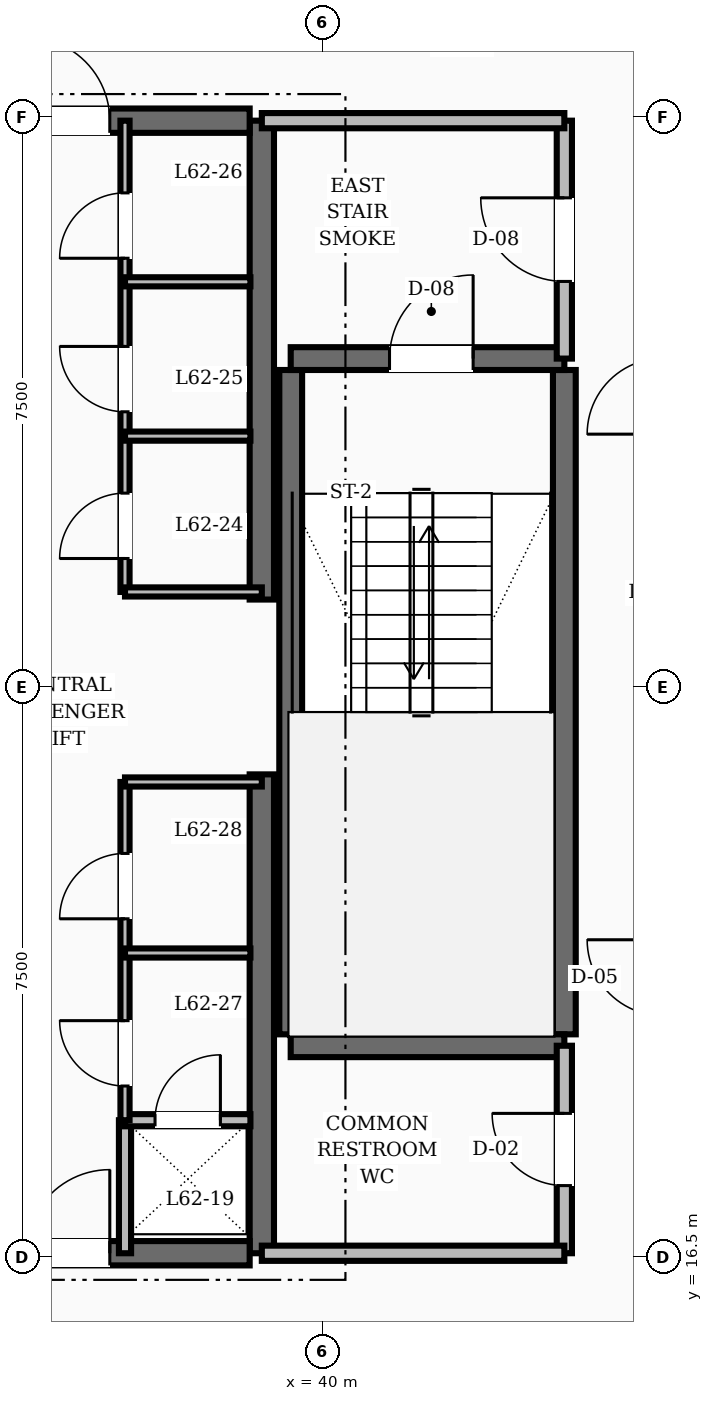
"""IFC4 building model, lengths in metres.
Left out: names, types, materials, properties, quantities, classifications, styles, units other than length and angle.
Written with IfcOpenShell. Run it as: python <this file> out.ifc"""

import sys

from ifc_helpers import new_model, si_unit, direction, frame, frame_2d, origin, place, context, subcontext, project, spatial, rectangle, extrude, element, fill, save


model = new_model("IFC4")
c1 = context("Model", 3, precision=1e-05, world=origin(), true_north=direction((0.0, 1.0)))
c2 = subcontext(c1, "Body", "Model", "MODEL_VIEW")
j1 = project(units=[si_unit("LENGTHUNIT", "METRE"), si_unit("PLANEANGLEUNIT", "RADIAN")], contexts=[c1])
p1 = place(None, origin())
s1 = spatial("IfcSite", under=j1, at=p1, CompositionType="ELEMENT")
p2 = place(p1, origin())
s2 = spatial("IfcBuilding", under=s1, at=p2, CompositionType="ELEMENT")
p3 = place(p2, frame((0.0, 0.0, 240.0)))
s3 = spatial("IfcBuildingStorey", under=s2, at=p3, CompositionType="ELEMENT", Elevation=240.0)
for number, where, z_axis, x_axis in (
    (1, (39.2, 16.55, 0.0), (0.0, 0.0, 1.0), (0.0, 1.0, 0.0)),
    (2, (39.2, 25.15, 0.0), (0.0, 0.0, 1.0), (0.0, 1.0, 0.0)),
):
    element("IfcWall", number, at=place(p3, frame(where, z_axis=z_axis, x_axis=x_axis)), inside=s3, PredefinedType="SHEAR", context=c2, shape_type="SweptSolid", body=[
        extrude(rectangle(XDim=6.3, YDim=0.32, at=frame_2d((3.15, 0.0))), origin(), (0.0, 0.0, 1.0), 3.6),
    ])
p4 = place(p3, frame((35.8, 16.55, 0.0), z_axis=(0.0, 0.0, 1.0), x_axis=(1.0, 0.0, 0.0)))
e3 = element("IfcWall", 3, at=p4, inside=s3, PredefinedType="SHEAR", context=c2, shape_type="SweptSolid", body=[
    extrude(rectangle(XDim=3.24, YDim=0.32, at=frame_2d((1.62, 0.0))), origin(), (0.0, 0.0, 1.0), 3.6),
])
p5 = place(p4, frame((0.3, 0.0, 0.0)))
e4 = element("IfcOpeningElement", 4, at=p5, cuts=e3, PredefinedType="OPENING", context=c2, shape_type="SweptSolid", body=[
    extrude(rectangle(XDim=1.1, YDim=2.1, at=frame_2d((0.55, 1.05))), frame((0.0, 0.17, 0.0), z_axis=(0.0, -1.0, 0.0), x_axis=(1.0, 0.0, 0.0)), (0.0, 0.0, 1.0), 0.34),
])
p6 = place(p3, frame((35.8, 31.45, 0.0), z_axis=(0.0, 0.0, 1.0), x_axis=(1.0, 0.0, 0.0)))
e5 = element("IfcWall", 5, at=p6, inside=s3, PredefinedType="SHEAR", context=c2, shape_type="SweptSolid", body=[
    extrude(rectangle(XDim=3.24, YDim=0.32, at=frame_2d((1.62, 0.0))), origin(), (0.0, 0.0, 1.0), 3.6),
])
p7 = place(p6, frame((0.3, 0.0, 0.0)))
e6 = element("IfcOpeningElement", 6, at=p7, cuts=e5, PredefinedType="OPENING", context=c2, shape_type="SweptSolid", body=[
    extrude(rectangle(XDim=1.1, YDim=2.1, at=frame_2d((0.55, 1.05))), frame((0.0, 0.17, 0.0), z_axis=(0.0, -1.0, 0.0), x_axis=(1.0, 0.0, 0.0)), (0.0, 0.0, 1.0), 0.34),
])
for number, where, z_axis, x_axis in (
    (7, (43.18, 19.43, 0.0), (0.0, 0.0, 1.0), (0.0, 1.0, 0.0)),
    (8, (39.58, 19.43, 0.0), (0.0, 0.0, 1.0), (0.0, 1.0, 0.0)),
):
    element("IfcWall", number, at=place(p3, frame(where, z_axis=z_axis, x_axis=x_axis)), inside=s3, PredefinedType="SHEAR", context=c2, shape_type="SweptSolid", body=[
        extrude(rectangle(XDim=8.74, YDim=0.3, at=frame_2d((4.37, 0.0))), origin(), (0.0, 0.0, 1.0), 3.6),
    ])
p8 = place(p3, frame((39.58, 19.28, 0.0), z_axis=(0.0, 0.0, 1.0), x_axis=(1.0, 0.0, 0.0)))
e9 = element("IfcWall", 9, at=p8, inside=s3, PredefinedType="SHEAR", context=c2, shape_type="SweptSolid", body=[
    extrude(rectangle(XDim=3.6, YDim=0.3, at=frame_2d((1.8, 0.0))), origin(), (0.0, 0.0, 1.0), 3.6),
])
p9 = place(p3, frame((39.58, 28.32, 0.0), z_axis=(0.0, 0.0, 1.0), x_axis=(1.0, 0.0, 0.0)))
e10 = element("IfcWall", 10, at=p9, inside=s3, PredefinedType="SHEAR", context=c2, shape_type="SweptSolid", body=[
    extrude(rectangle(XDim=3.6, YDim=0.3, at=frame_2d((1.8, 0.0))), origin(), (0.0, 0.0, 1.0), 3.6),
])
p10 = place(p9, frame((1.3, 0.0, 0.0)))
e11 = element("IfcOpeningElement", 11, at=p10, cuts=e10, PredefinedType="OPENING", context=c2, shape_type="SweptSolid", body=[
    extrude(rectangle(XDim=1.1, YDim=2.1, at=frame_2d((0.55, 1.05))), frame((0.0, 0.16, 0.0), z_axis=(0.0, -1.0, 0.0), x_axis=(1.0, 0.0, 0.0)), (0.0, 0.0, 1.0), 0.32),
])
p11 = place(p3, frame((43.18, 28.32, 0.0), z_axis=(0.0, 0.0, 1.0), x_axis=(0.0, 1.0, 0.0)))
e12 = element("IfcWall", 12, at=p11, inside=s3, PredefinedType="SOLIDWALL", context=c2, shape_type="SweptSolid", body=[
    extrude(rectangle(XDim=3.13, YDim=0.2, at=frame_2d((1.565, 0.0))), origin(), (0.0, 0.0, 1.0), 2.87),
])
p12 = place(p11, frame((1.015, 0.0, 0.0)))
e13 = element("IfcOpeningElement", 13, at=p12, cuts=e12, PredefinedType="OPENING", context=c2, shape_type="SweptSolid", body=[
    extrude(rectangle(XDim=1.1, YDim=2.1, at=frame_2d((0.55, 1.05))), frame((0.0, 0.11, 0.0), z_axis=(0.0, -1.0, 0.0), x_axis=(1.0, 0.0, 0.0)), (0.0, 0.0, 1.0), 0.22),
])
p13 = place(p3, frame((39.2, 31.45, 0.0), z_axis=(0.0, 0.0, 1.0), x_axis=(1.0, 0.0, 0.0)))
e14 = element("IfcWall", 14, at=p13, inside=s3, PredefinedType="SOLIDWALL", context=c2, shape_type="SweptSolid", body=[
    extrude(rectangle(XDim=3.98, YDim=0.2, at=frame_2d((1.99, 0.0))), origin(), (0.0, 0.0, 1.0), 2.87),
])
p14 = place(p3, frame((43.18, 16.55, 0.0), z_axis=(0.0, 0.0, 1.0), x_axis=(0.0, 1.0, 0.0)))
e15 = element("IfcWall", 15, at=p14, inside=s3, PredefinedType="SOLIDWALL", context=c2, shape_type="SweptSolid", body=[
    extrude(rectangle(XDim=2.73, YDim=0.2, at=frame_2d((1.365, 0.0))), origin(), (0.0, 0.0, 1.0), 2.87),
])
p15 = place(p14, frame((0.89, 0.0, 0.0)))
e16 = element("IfcOpeningElement", 16, at=p15, cuts=e15, PredefinedType="OPENING", context=c2, shape_type="SweptSolid", body=[
    extrude(rectangle(XDim=0.95, YDim=2.1, at=frame_2d((0.475, 1.05))), frame((0.0, 0.11, 0.0), z_axis=(0.0, -1.0, 0.0), x_axis=(1.0, 0.0, 0.0)), (0.0, 0.0, 1.0), 0.22),
])
p16 = place(p3, frame((39.2, 16.55, 0.0), z_axis=(0.0, 0.0, 1.0), x_axis=(1.0, 0.0, 0.0)))
e17 = element("IfcWall", 17, at=p16, inside=s3, PredefinedType="SOLIDWALL", context=c2, shape_type="SweptSolid", body=[
    extrude(rectangle(XDim=3.98, YDim=0.2, at=frame_2d((1.99, 0.0))), origin(), (0.0, 0.0, 1.0), 2.87),
])
p17 = place(p3, frame((37.4, 16.55, 0.0), z_axis=(0.0, 0.0, 1.0), x_axis=(0.0, 1.0, 0.0)))
e18 = element("IfcWall", 18, at=p17, inside=s3, PredefinedType="SOLIDWALL", context=c2, shape_type="SweptSolid", body=[
    extrude(rectangle(XDim=1.75, YDim=0.16, at=frame_2d((0.875, 0.0))), origin(), (0.0, 0.0, 1.0), 2.87),
])
p18 = place(p3, frame((37.4, 18.3, 0.0), z_axis=(0.0, 0.0, 1.0), x_axis=(1.0, 0.0, 0.0)))
e19 = element("IfcWall", 19, at=p18, inside=s3, PredefinedType="SOLIDWALL", context=c2, shape_type="SweptSolid", body=[
    extrude(rectangle(XDim=1.65, YDim=0.16, at=frame_2d((0.825, 0.0))), origin(), (0.0, 0.0, 1.0), 2.87),
])
p19 = place(p18, frame((0.395, 0.0, 0.0)))
e20 = element("IfcOpeningElement", 20, at=p19, cuts=e19, PredefinedType="OPENING", context=c2, shape_type="SweptSolid", body=[
    extrude(rectangle(XDim=0.86, YDim=2.1, at=frame_2d((0.43, 1.05))), frame((0.0, 0.09, 0.0), z_axis=(0.0, -1.0, 0.0), x_axis=(1.0, 0.0, 0.0)), (0.0, 0.0, 1.0), 0.18),
])
p20 = place(p3, frame((37.4, 25.25, 0.0), z_axis=(0.0, 0.0, 1.0), x_axis=(0.0, 1.0, 0.0)))
e21 = element("IfcWall", 21, at=p20, inside=s3, PredefinedType="PARTITIONING", context=c2, shape_type="SweptSolid", body=[
    extrude(rectangle(XDim=6.2, YDim=0.12, at=frame_2d((3.1, 0.0))), origin(), (0.0, 0.0, 1.0), 2.87),
])
p21 = place(p20, frame((0.44, 0.0, 0.0)))
e22 = element("IfcOpeningElement", 22, at=p21, cuts=e21, PredefinedType="OPENING", context=c2, shape_type="SweptSolid", body=[
    extrude(rectangle(XDim=0.86, YDim=2.1, at=frame_2d((0.43, 1.05))), frame((0.0, 0.07, 0.0), z_axis=(0.0, -1.0, 0.0), x_axis=(1.0, 0.0, 0.0)), (0.0, 0.0, 1.0), 0.14),
])
p22 = place(p20, frame((2.37, 0.0, 0.0)))
e23 = element("IfcOpeningElement", 23, at=p22, cuts=e21, PredefinedType="OPENING", context=c2, shape_type="SweptSolid", body=[
    extrude(rectangle(XDim=0.86, YDim=2.1, at=frame_2d((0.43, 1.05))), frame((0.0, 0.07, 0.0), z_axis=(0.0, -1.0, 0.0), x_axis=(1.0, 0.0, 0.0)), (0.0, 0.0, 1.0), 0.14),
])
p23 = place(p20, frame((4.39, 0.0, 0.0)))
e24 = element("IfcOpeningElement", 24, at=p23, cuts=e21, PredefinedType="OPENING", context=c2, shape_type="SweptSolid", body=[
    extrude(rectangle(XDim=0.86, YDim=2.1, at=frame_2d((0.43, 1.05))), frame((0.0, 0.07, 0.0), z_axis=(0.0, -1.0, 0.0), x_axis=(1.0, 0.0, 0.0)), (0.0, 0.0, 1.0), 0.14),
])
p24 = place(p3, frame((37.4, 25.25, 0.0), z_axis=(0.0, 0.0, 1.0), x_axis=(1.0, 0.0, 0.0)))
e25 = element("IfcWall", 25, at=p24, inside=s3, PredefinedType="PARTITIONING", context=c2, shape_type="SweptSolid", body=[
    extrude(rectangle(XDim=1.8, YDim=0.12, at=frame_2d((0.9, 0.0))), origin(), (0.0, 0.0, 1.0), 2.87),
])
p25 = place(p3, frame((37.4, 18.3, 0.0), z_axis=(0.0, 0.0, 1.0), x_axis=(0.0, 1.0, 0.0)))
e26 = element("IfcWall", 26, at=p25, inside=s3, PredefinedType="PARTITIONING", context=c2, shape_type="SweptSolid", body=[
    extrude(rectangle(XDim=4.45, YDim=0.12, at=frame_2d((2.225, 0.0))), origin(), (0.0, 0.0, 1.0), 2.87),
])
p26 = place(p25, frame((0.45, 0.0, 0.0)))
e27 = element("IfcOpeningElement", 27, at=p26, cuts=e26, PredefinedType="OPENING", context=c2, shape_type="SweptSolid", body=[
    extrude(rectangle(XDim=0.86, YDim=2.1, at=frame_2d((0.43, 1.05))), frame((0.0, 0.07, 0.0), z_axis=(0.0, -1.0, 0.0), x_axis=(1.0, 0.0, 0.0)), (0.0, 0.0, 1.0), 0.14),
])
p27 = place(p25, frame((2.65, 0.0, 0.0)))
e28 = element("IfcOpeningElement", 28, at=p27, cuts=e26, PredefinedType="OPENING", context=c2, shape_type="SweptSolid", body=[
    extrude(rectangle(XDim=0.86, YDim=2.1, at=frame_2d((0.43, 1.05))), frame((0.0, 0.07, 0.0), z_axis=(0.0, -1.0, 0.0), x_axis=(1.0, 0.0, 0.0)), (0.0, 0.0, 1.0), 0.14),
])
p28 = place(p3, frame((37.4, 22.75, 0.0), z_axis=(0.0, 0.0, 1.0), x_axis=(1.0, 0.0, 0.0)))
e29 = element("IfcWall", 29, at=p28, inside=s3, PredefinedType="PARTITIONING", context=c2, shape_type="SweptSolid", body=[
    extrude(rectangle(XDim=1.8, YDim=0.12, at=frame_2d((0.9, 0.0))), origin(), (0.0, 0.0, 1.0), 2.87),
])
for number, where, z_axis, x_axis in (
    (30, (37.4, 27.3, 0.0), (0.0, 0.0, 1.0), (1.0, 0.0, 0.0)),
    (31, (37.4, 29.33, 0.0), (0.0, 0.0, 1.0), (1.0, 0.0, 0.0)),
    (32, (37.4, 20.5, 0.0), (0.0, 0.0, 1.0), (1.0, 0.0, 0.0)),
):
    element("IfcWall", number, at=place(p3, frame(where, z_axis=z_axis, x_axis=x_axis)), inside=s3, PredefinedType="PARTITIONING", context=c2, shape_type="SweptSolid", body=[
        extrude(rectangle(XDim=1.65, YDim=0.12, at=frame_2d((0.825, 0.0))), origin(), (0.0, 0.0, 1.0), 2.87),
    ])
for number, where, z_axis, x_axis in (
    (33, (44.427, 32.303, 0.0), (0.0, 0.0, 1.0), (-0.707, 0.707, 0.0)),
    (34, (42.365, 13.635, 0.0), (0.0, 0.0, 1.0), (0.707, 0.707, 0.0)),
):
    element("IfcWall", number, at=place(p3, frame(where, z_axis=z_axis, x_axis=x_axis)), inside=s3, PredefinedType="SOLIDWALL", context=c2, shape_type="SweptSolid", body=[
        extrude(rectangle(XDim=2.916, YDim=0.16, at=frame_2d((1.458, 0.0))), origin(), (0.0, 0.0, 1.0), 2.87),
    ])
p29 = place(p10, origin())
e35 = element("IfcDoor", 35, at=p29, inside=s3, OperationType="SINGLE_SWING_RIGHT", PredefinedType="DOOR", context=c2, shape_type="SweptSolid", body=[
    extrude(rectangle(XDim=1.1, YDim=2.1, at=frame_2d((0.55, 1.05))), frame((0.0, 0.025, 0.0), z_axis=(0.0, -1.0, 0.0), x_axis=(1.0, 0.0, 0.0)), (0.0, 0.0, 1.0), 0.05),
])
fill(e11, e35)
p30 = place(p12, origin())
e36 = element("IfcDoor", 36, at=p30, inside=s3, OperationType="SINGLE_SWING_RIGHT", PredefinedType="DOOR", context=c2, shape_type="SweptSolid", body=[
    extrude(rectangle(XDim=1.1, YDim=2.1, at=frame_2d((0.55, 1.05))), frame((0.0, 0.025, 0.0), z_axis=(0.0, -1.0, 0.0), x_axis=(1.0, 0.0, 0.0)), (0.0, 0.0, 1.0), 0.05),
])
fill(e13, e36)
p31 = place(p15, origin())
e37 = element("IfcDoor", 37, at=p31, inside=s3, OperationType="SINGLE_SWING_RIGHT", PredefinedType="DOOR", context=c2, shape_type="SweptSolid", body=[
    extrude(rectangle(XDim=0.95, YDim=2.1, at=frame_2d((0.475, 1.05))), frame((0.0, 0.025, 0.0), z_axis=(0.0, -1.0, 0.0), x_axis=(1.0, 0.0, 0.0)), (0.0, 0.0, 1.0), 0.05),
])
fill(e16, e37)
p32 = place(p7, origin())
e38 = element("IfcDoor", 38, at=p32, inside=s3, OperationType="SINGLE_SWING_LEFT", PredefinedType="DOOR", context=c2, shape_type="SweptSolid", body=[
    extrude(rectangle(XDim=1.1, YDim=2.1, at=frame_2d((0.55, 1.05))), frame((0.0, 0.025, 0.0), z_axis=(0.0, -1.0, 0.0), x_axis=(1.0, 0.0, 0.0)), (0.0, 0.0, 1.0), 0.05),
])
fill(e6, e38)
p33 = place(p5, origin())
e39 = element("IfcDoor", 39, at=p33, inside=s3, OperationType="SINGLE_SWING_RIGHT", PredefinedType="DOOR", context=c2, shape_type="SweptSolid", body=[
    extrude(rectangle(XDim=1.1, YDim=2.1, at=frame_2d((0.55, 1.05))), frame((0.0, 0.025, 0.0), z_axis=(0.0, -1.0, 0.0), x_axis=(1.0, 0.0, 0.0)), (0.0, 0.0, 1.0), 0.05),
])
fill(e4, e39)
p34 = place(p19, origin())
e40 = element("IfcDoor", 40, at=p34, inside=s3, OperationType="SINGLE_SWING_RIGHT", PredefinedType="TRAPDOOR", context=c2, shape_type="SweptSolid", body=[
    extrude(rectangle(XDim=0.86, YDim=2.1, at=frame_2d((0.43, 1.05))), frame((0.0, 0.025, 0.0), z_axis=(0.0, -1.0, 0.0), x_axis=(1.0, 0.0, 0.0)), (0.0, 0.0, 1.0), 0.05),
])
fill(e20, e40)
p35 = place(p21, origin())
e41 = element("IfcDoor", 41, at=p35, inside=s3, OperationType="SINGLE_SWING_LEFT", PredefinedType="DOOR", context=c2, shape_type="SweptSolid", body=[
    extrude(rectangle(XDim=0.86, YDim=2.1, at=frame_2d((0.43, 1.05))), frame((0.0, 0.025, 0.0), z_axis=(0.0, -1.0, 0.0), x_axis=(1.0, 0.0, 0.0)), (0.0, 0.0, 1.0), 0.05),
])
fill(e22, e41)
p36 = place(p22, origin())
e42 = element("IfcDoor", 42, at=p36, inside=s3, OperationType="SINGLE_SWING_RIGHT", PredefinedType="DOOR", context=c2, shape_type="SweptSolid", body=[
    extrude(rectangle(XDim=0.86, YDim=2.1, at=frame_2d((0.43, 1.05))), frame((0.0, 0.025, 0.0), z_axis=(0.0, -1.0, 0.0), x_axis=(1.0, 0.0, 0.0)), (0.0, 0.0, 1.0), 0.05),
])
fill(e23, e42)
p37 = place(p23, origin())
e43 = element("IfcDoor", 43, at=p37, inside=s3, OperationType="SINGLE_SWING_LEFT", PredefinedType="DOOR", context=c2, shape_type="SweptSolid", body=[
    extrude(rectangle(XDim=0.86, YDim=2.1, at=frame_2d((0.43, 1.05))), frame((0.0, 0.025, 0.0), z_axis=(0.0, -1.0, 0.0), x_axis=(1.0, 0.0, 0.0)), (0.0, 0.0, 1.0), 0.05),
])
fill(e24, e43)
p38 = place(p26, origin())
e44 = element("IfcDoor", 44, at=p38, inside=s3, OperationType="SINGLE_SWING_RIGHT", PredefinedType="DOOR", context=c2, shape_type="SweptSolid", body=[
    extrude(rectangle(XDim=0.86, YDim=2.1, at=frame_2d((0.43, 1.05))), frame((0.0, 0.025, 0.0), z_axis=(0.0, -1.0, 0.0), x_axis=(1.0, 0.0, 0.0)), (0.0, 0.0, 1.0), 0.05),
])
fill(e27, e44)
p39 = place(p27, origin())
e45 = element("IfcDoor", 45, at=p39, inside=s3, OperationType="SINGLE_SWING_LEFT", PredefinedType="DOOR", context=c2, shape_type="SweptSolid", body=[
    extrude(rectangle(XDim=0.86, YDim=2.1, at=frame_2d((0.43, 1.05))), frame((0.0, 0.025, 0.0), z_axis=(0.0, -1.0, 0.0), x_axis=(1.0, 0.0, 0.0)), (0.0, 0.0, 1.0), 0.05),
])
fill(e28, e45)
save(model, sys.argv[1])
